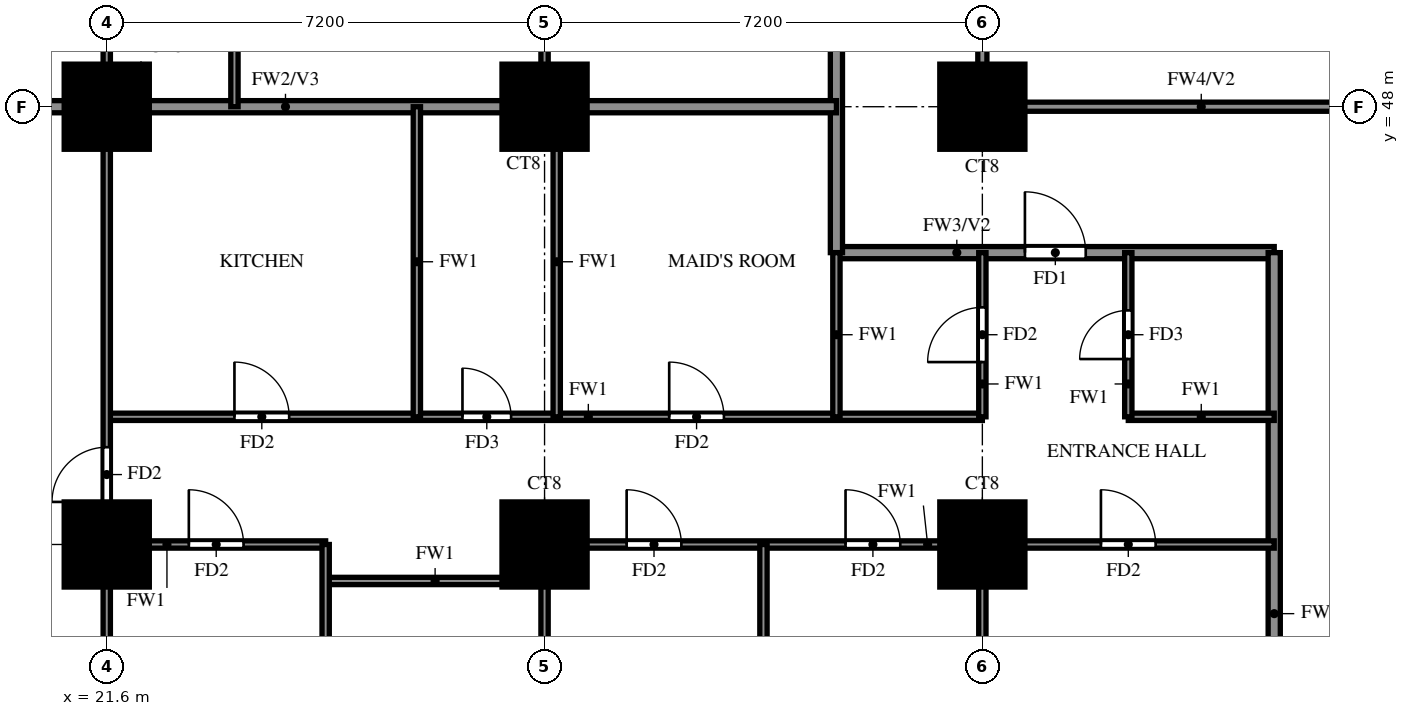
"""IFC4 building model, lengths in metres.
Left out: names, types, materials, properties, quantities, classifications, styles, units other than length and angle.
Written with IfcOpenShell. Run it as: python <this file> out.ifc"""

import sys

from ifc_helpers import new_model, si_unit, direction, frame, frame_2d, origin, origin_2d, place, context, subcontext, project, spatial, rectangle, extrude, source, transform, mapped, element, fill, save


model = new_model("IFC4")
c1 = context("Model", 3, precision=1e-05, world=origin(), true_north=direction((0.0, 1.0)))
c2 = subcontext(c1, "Body", "Model", "MODEL_VIEW")
j1 = project(units=[si_unit("LENGTHUNIT", "METRE"), si_unit("PLANEANGLEUNIT", "RADIAN")], contexts=[c1])
p1 = place(None, origin())
s1 = spatial("IfcSite", under=j1, at=p1, CompositionType="ELEMENT")
p2 = place(p1, origin())
s2 = spatial("IfcBuilding", under=s1, at=p2, CompositionType="ELEMENT")
p3 = place(p2, frame((0.0, 0.0, 41.0)))
s3 = spatial("IfcBuildingStorey", under=s2, at=p3, CompositionType="ELEMENT", Elevation=41.0)
m1 = source(origin(), c2, "Body", "SweptSolid", [
    extrude(rectangle(XDim=1.4, YDim=1.4, at=origin_2d()), origin(), (0.0, 0.0, 1.0), 3.18),
])
for number, where, z_axis, x_axis in (
    (1, (21.6, 40.8, 0.0), (0.0, 0.0, 1.0), (1.0, 0.0, 0.0)),
    (2, (28.8, 40.8, 0.0), (0.0, 0.0, 1.0), (1.0, 0.0, 0.0)),
    (3, (36.0, 40.8, 0.0), (0.0, 0.0, 1.0), (1.0, 0.0, 0.0)),
    (4, (21.6, 48.0, 0.0), (0.0, 0.0, 1.0), (1.0, 0.0, 0.0)),
    (5, (28.8, 48.0, 0.0), (0.0, 0.0, 1.0), (1.0, 0.0, 0.0)),
    (6, (36.0, 48.0, 0.0), (0.0, 0.0, 1.0), (1.0, 0.0, 0.0)),
):
    element("IfcColumn", number, at=place(p3, frame(where, z_axis=z_axis, x_axis=x_axis)), inside=s3, PredefinedType="COLUMN", context=c2, shape_type="MappedRepresentation", body=[
        mapped(m1, transform((0.0, 0.0, 0.0))),
    ])
p4 = place(p3, frame((33.6, 45.6, 0.0), z_axis=(0.0, 0.0, 1.0), x_axis=(1.0, 0.0, 0.0)))
e7 = element("IfcWall", 7, at=p4, inside=s3, PredefinedType="SOLIDWALL", context=c2, shape_type="SweptSolid", body=[
    extrude(rectangle(XDim=7.2, YDim=0.2, at=frame_2d((3.6, 0.0))), origin(), (0.0, 0.0, 1.0), 3.18),
])
p5 = place(p4, frame((3.1, 0.0, 0.0)))
e8 = element("IfcOpeningElement", 8, at=p5, cuts=e7, PredefinedType="OPENING", context=c2, shape_type="SweptSolid", body=[
    extrude(rectangle(XDim=1.0, YDim=2.1, at=frame_2d((0.5, 1.05))), frame((0.0, 0.11, 0.0), z_axis=(0.0, -1.0, 0.0), x_axis=(1.0, 0.0, 0.0)), (0.0, 0.0, 1.0), 0.22),
])
p6 = place(p3, frame((33.6, 45.6, 0.0), z_axis=(0.0, 0.0, 1.0), x_axis=(0.0, 1.0, 0.0)))
e9 = element("IfcWall", 9, at=p6, inside=s3, PredefinedType="SOLIDWALL", context=c2, shape_type="SweptSolid", body=[
    extrude(rectangle(XDim=8.4, YDim=0.2, at=frame_2d((4.2, 0.0))), origin(), (0.0, 0.0, 1.0), 3.18),
])
p7 = place(p3, frame((40.8, 33.725, 0.0), z_axis=(0.0, 0.0, 1.0), x_axis=(0.0, 1.0, 0.0)))
e10 = element("IfcWall", 10, at=p7, inside=s3, PredefinedType="SOLIDWALL", context=c2, shape_type="SweptSolid", body=[
    extrude(rectangle(XDim=11.875, YDim=0.2, at=frame_2d((5.938, 0.0))), origin(), (0.0, 0.0, 1.0), 2.28),
])
p8 = place(p3, frame((14.525, 48.0, 0.0), z_axis=(0.0, 0.0, 1.0), x_axis=(1.0, 0.0, 0.0)))
e11 = element("IfcWall", 11, at=p8, inside=s3, PredefinedType="SOLIDWALL", context=c2, shape_type="SweptSolid", body=[
    extrude(rectangle(XDim=19.075, YDim=0.2, at=frame_2d((9.538, 0.0))), origin(), (0.0, 0.0, 1.0), 3.18),
])
p9 = place(p3, frame((25.2, 40.2, 0.0), z_axis=(0.0, 0.0, 1.0), x_axis=(1.0, 0.0, 0.0)))
e12 = element("IfcWall", 12, at=p9, inside=s3, PredefinedType="PARTITIONING", context=c2, shape_type="SweptSolid", body=[
    extrude(rectangle(XDim=3.6, YDim=0.12, at=frame_2d((1.8, 0.0))), origin(), (0.0, 0.0, 1.0), 3.18),
])
p10 = place(p3, frame((21.6, 40.8, 0.0), z_axis=(0.0, 0.0, 1.0), x_axis=(1.0, 0.0, 0.0)))
e13 = element("IfcWall", 13, at=p10, inside=s3, PredefinedType="PARTITIONING", context=c2, shape_type="SweptSolid", body=[
    extrude(rectangle(XDim=3.6, YDim=0.12, at=frame_2d((1.8, 0.0))), origin(), (0.0, 0.0, 1.0), 3.18),
])
p11 = place(p10, frame((1.35, 0.0, 0.0)))
e14 = element("IfcOpeningElement", 14, at=p11, cuts=e13, PredefinedType="OPENING", context=c2, shape_type="SweptSolid", body=[
    extrude(rectangle(XDim=0.9, YDim=2.1, at=frame_2d((0.45, 1.05))), frame((0.0, 0.07, 0.0), z_axis=(0.0, -1.0, 0.0), x_axis=(1.0, 0.0, 0.0)), (0.0, 0.0, 1.0), 0.14),
])
p12 = place(p3, frame((28.8, 40.8, 0.0), z_axis=(0.0, 0.0, 1.0), x_axis=(1.0, 0.0, 0.0)))
e15 = element("IfcWall", 15, at=p12, inside=s3, PredefinedType="PARTITIONING", context=c2, shape_type="SweptSolid", body=[
    extrude(rectangle(XDim=12.0, YDim=0.12, at=frame_2d((6.0, 0.0))), origin(), (0.0, 0.0, 1.0), 3.18),
])
p13 = place(p12, frame((1.35, 0.0, 0.0)))
e16 = element("IfcOpeningElement", 16, at=p13, cuts=e15, PredefinedType="OPENING", context=c2, shape_type="SweptSolid", body=[
    extrude(rectangle(XDim=0.9, YDim=2.1, at=frame_2d((0.45, 1.05))), frame((0.0, 0.07, 0.0), z_axis=(0.0, -1.0, 0.0), x_axis=(1.0, 0.0, 0.0)), (0.0, 0.0, 1.0), 0.14),
])
p14 = place(p12, frame((4.95, 0.0, 0.0)))
e17 = element("IfcOpeningElement", 17, at=p14, cuts=e15, PredefinedType="OPENING", context=c2, shape_type="SweptSolid", body=[
    extrude(rectangle(XDim=0.9, YDim=2.1, at=frame_2d((0.45, 1.05))), frame((0.0, 0.07, 0.0), z_axis=(0.0, -1.0, 0.0), x_axis=(1.0, 0.0, 0.0)), (0.0, 0.0, 1.0), 0.14),
])
p15 = place(p12, frame((9.15, 0.0, 0.0)))
e18 = element("IfcOpeningElement", 18, at=p15, cuts=e15, PredefinedType="OPENING", context=c2, shape_type="SweptSolid", body=[
    extrude(rectangle(XDim=0.9, YDim=2.1, at=frame_2d((0.45, 1.05))), frame((0.0, 0.07, 0.0), z_axis=(0.0, -1.0, 0.0), x_axis=(1.0, 0.0, 0.0)), (0.0, 0.0, 1.0), 0.14),
])
p16 = place(p3, frame((21.6, 42.9, 0.0), z_axis=(0.0, 0.0, 1.0), x_axis=(1.0, 0.0, 0.0)))
e19 = element("IfcWall", 19, at=p16, inside=s3, PredefinedType="PARTITIONING", context=c2, shape_type="SweptSolid", body=[
    extrude(rectangle(XDim=14.4, YDim=0.12, at=frame_2d((7.2, 0.0))), origin(), (0.0, 0.0, 1.0), 3.18),
])
p17 = place(p16, frame((2.1, 0.0, 0.0)))
e20 = element("IfcOpeningElement", 20, at=p17, cuts=e19, PredefinedType="OPENING", context=c2, shape_type="SweptSolid", body=[
    extrude(rectangle(XDim=0.9, YDim=2.1, at=frame_2d((0.45, 1.05))), frame((0.0, 0.07, 0.0), z_axis=(0.0, -1.0, 0.0), x_axis=(1.0, 0.0, 0.0)), (0.0, 0.0, 1.0), 0.14),
])
p18 = place(p16, frame((5.85, 0.0, 0.0)))
e21 = element("IfcOpeningElement", 21, at=p18, cuts=e19, PredefinedType="OPENING", context=c2, shape_type="SweptSolid", body=[
    extrude(rectangle(XDim=0.8, YDim=2.1, at=frame_2d((0.4, 1.05))), frame((0.0, 0.07, 0.0), z_axis=(0.0, -1.0, 0.0), x_axis=(1.0, 0.0, 0.0)), (0.0, 0.0, 1.0), 0.14),
])
p19 = place(p16, frame((9.25, 0.0, 0.0)))
e22 = element("IfcOpeningElement", 22, at=p19, cuts=e19, PredefinedType="OPENING", context=c2, shape_type="SweptSolid", body=[
    extrude(rectangle(XDim=0.9, YDim=2.1, at=frame_2d((0.45, 1.05))), frame((0.0, 0.07, 0.0), z_axis=(0.0, -1.0, 0.0), x_axis=(1.0, 0.0, 0.0)), (0.0, 0.0, 1.0), 0.14),
])
p20 = place(p3, frame((38.4, 42.9, 0.0), z_axis=(0.0, 0.0, 1.0), x_axis=(1.0, 0.0, 0.0)))
e23 = element("IfcWall", 23, at=p20, inside=s3, PredefinedType="PARTITIONING", context=c2, shape_type="SweptSolid", body=[
    extrude(rectangle(XDim=2.4, YDim=0.12, at=frame_2d((1.2, 0.0))), origin(), (0.0, 0.0, 1.0), 3.18),
])
p21 = place(p3, frame((21.6, 33.725, 0.0), z_axis=(0.0, 0.0, 1.0), x_axis=(0.0, 1.0, 0.0)))
e24 = element("IfcWall", 24, at=p21, inside=s3, PredefinedType="PARTITIONING", context=c2, shape_type="SweptSolid", body=[
    extrude(rectangle(XDim=35.875, YDim=0.12, at=frame_2d((17.938, 0.0))), origin(), (0.0, 0.0, 1.0), 3.18),
])
p22 = place(p21, frame((7.775, 0.0, 0.0)))
e25 = element("IfcOpeningElement", 25, at=p22, cuts=e24, PredefinedType="OPENING", context=c2, shape_type="SweptSolid", body=[
    extrude(rectangle(XDim=0.9, YDim=2.1, at=frame_2d((0.45, 1.05))), frame((0.0, 0.07, 0.0), z_axis=(0.0, -1.0, 0.0), x_axis=(1.0, 0.0, 0.0)), (0.0, 0.0, 1.0), 0.14),
])
p23 = place(p21, frame((15.625, 0.0, 0.0)))
e26 = element("IfcOpeningElement", 26, at=p23, cuts=e24, PredefinedType="OPENING", context=c2, shape_type="SweptSolid", body=[
    extrude(rectangle(XDim=0.9, YDim=2.1, at=frame_2d((0.45, 1.05))), frame((0.0, 0.07, 0.0), z_axis=(0.0, -1.0, 0.0), x_axis=(1.0, 0.0, 0.0)), (0.0, 0.0, 1.0), 0.14),
])
p24 = place(p21, frame((22.225, 0.0, 0.0)))
e27 = element("IfcOpeningElement", 27, at=p24, cuts=e24, PredefinedType="OPENING", context=c2, shape_type="SweptSolid", body=[
    extrude(rectangle(XDim=1.5, YDim=2.1, at=frame_2d((0.75, 1.05))), frame((0.0, 0.07, 0.0), z_axis=(0.0, -1.0, 0.0), x_axis=(1.0, 0.0, 0.0)), (0.0, 0.0, 1.0), 0.14),
])
p25 = place(p21, frame((26.425, 0.0, 0.0)))
e28 = element("IfcOpeningElement", 28, at=p25, cuts=e24, PredefinedType="OPENING", context=c2, shape_type="SweptSolid", body=[
    extrude(rectangle(XDim=0.9, YDim=2.1, at=frame_2d((0.45, 1.05))), frame((0.0, 0.07, 0.0), z_axis=(0.0, -1.0, 0.0), x_axis=(1.0, 0.0, 0.0)), (0.0, 0.0, 1.0), 0.14),
])
p26 = place(p21, frame((31.825, 0.0, 0.0)))
e29 = element("IfcOpeningElement", 29, at=p26, cuts=e24, PredefinedType="OPENING", context=c2, shape_type="SweptSolid", body=[
    extrude(rectangle(XDim=0.9, YDim=2.1, at=frame_2d((0.45, 1.05))), frame((0.0, 0.07, 0.0), z_axis=(0.0, -1.0, 0.0), x_axis=(1.0, 0.0, 0.0)), (0.0, 0.0, 1.0), 0.14),
])
p27 = place(p3, frame((23.7, 48.0, 0.0), z_axis=(0.0, 0.0, 1.0), x_axis=(0.0, 1.0, 0.0)))
e30 = element("IfcWall", 30, at=p27, inside=s3, PredefinedType="PARTITIONING", context=c2, shape_type="SweptSolid", body=[
    extrude(rectangle(XDim=3.6, YDim=0.12, at=frame_2d((1.8, 0.0))), origin(), (0.0, 0.0, 1.0), 3.18),
])
p28 = place(p3, frame((25.2, 33.725, 0.0), z_axis=(0.0, 0.0, 1.0), x_axis=(0.0, 1.0, 0.0)))
e31 = element("IfcWall", 31, at=p28, inside=s3, PredefinedType="PARTITIONING", context=c2, shape_type="SweptSolid", body=[
    extrude(rectangle(XDim=7.075, YDim=0.12, at=frame_2d((3.538, 0.0))), origin(), (0.0, 0.0, 1.0), 2.28),
])
p29 = place(p28, frame((2.837, 0.0, 0.0)))
e32 = element("IfcOpeningElement", 32, at=p29, cuts=e31, PredefinedType="OPENING", context=c2, shape_type="SweptSolid", body=[
    extrude(rectangle(XDim=0.8, YDim=2.1, at=frame_2d((0.4, 1.05))), frame((0.0, 0.07, 0.0), z_axis=(0.0, -1.0, 0.0), x_axis=(1.0, 0.0, 0.0)), (0.0, 0.0, 1.0), 0.14),
])
p30 = place(p3, frame((26.7, 42.9, 0.0), z_axis=(0.0, 0.0, 1.0), x_axis=(0.0, 1.0, 0.0)))
e33 = element("IfcWall", 33, at=p30, inside=s3, PredefinedType="PARTITIONING", context=c2, shape_type="SweptSolid", body=[
    extrude(rectangle(XDim=5.1, YDim=0.12, at=frame_2d((2.55, 0.0))), origin(), (0.0, 0.0, 1.0), 3.18),
])
p31 = place(p3, frame((28.8, 33.725, 0.0), z_axis=(0.0, 0.0, 1.0), x_axis=(0.0, 1.0, 0.0)))
e34 = element("IfcWall", 34, at=p31, inside=s3, PredefinedType="PARTITIONING", context=c2, shape_type="SweptSolid", body=[
    extrude(rectangle(XDim=7.075, YDim=0.12, at=frame_2d((3.538, 0.0))), origin(), (0.0, 0.0, 1.0), 3.18),
])
p32 = place(p3, frame((28.8, 48.0, 0.0), z_axis=(0.0, 0.0, 1.0), x_axis=(0.0, 1.0, 0.0)))
e35 = element("IfcWall", 35, at=p32, inside=s3, PredefinedType="PARTITIONING", context=c2, shape_type="SweptSolid", body=[
    extrude(rectangle(XDim=3.6, YDim=0.12, at=frame_2d((1.8, 0.0))), origin(), (0.0, 0.0, 1.0), 3.18),
])
p33 = place(p3, frame((29.0, 42.9, 0.0), z_axis=(0.0, 0.0, 1.0), x_axis=(0.0, 1.0, 0.0)))
e36 = element("IfcWall", 36, at=p33, inside=s3, PredefinedType="PARTITIONING", context=c2, shape_type="SweptSolid", body=[
    extrude(rectangle(XDim=5.1, YDim=0.12, at=frame_2d((2.55, 0.0))), origin(), (0.0, 0.0, 1.0), 3.18),
])
p34 = place(p3, frame((32.4, 33.725, 0.0), z_axis=(0.0, 0.0, 1.0), x_axis=(0.0, 1.0, 0.0)))
e37 = element("IfcWall", 37, at=p34, inside=s3, PredefinedType="PARTITIONING", context=c2, shape_type="SweptSolid", body=[
    extrude(rectangle(XDim=7.075, YDim=0.12, at=frame_2d((3.538, 0.0))), origin(), (0.0, 0.0, 1.0), 2.28),
])
p35 = place(p3, frame((33.6, 42.9, 0.0), z_axis=(0.0, 0.0, 1.0), x_axis=(0.0, 1.0, 0.0)))
e38 = element("IfcWall", 38, at=p35, inside=s3, PredefinedType="PARTITIONING", context=c2, shape_type="SweptSolid", body=[
    extrude(rectangle(XDim=2.7, YDim=0.12, at=frame_2d((1.35, 0.0))), origin(), (0.0, 0.0, 1.0), 3.18),
])
p36 = place(p3, frame((36.0, 33.725, 0.0), z_axis=(0.0, 0.0, 1.0), x_axis=(0.0, 1.0, 0.0)))
e39 = element("IfcWall", 39, at=p36, inside=s3, PredefinedType="PARTITIONING", context=c2, shape_type="SweptSolid", body=[
    extrude(rectangle(XDim=7.075, YDim=0.12, at=frame_2d((3.538, 0.0))), origin(), (0.0, 0.0, 1.0), 3.18),
])
p37 = place(p3, frame((36.0, 42.9, 0.0), z_axis=(0.0, 0.0, 1.0), x_axis=(0.0, 1.0, 0.0)))
e40 = element("IfcWall", 40, at=p37, inside=s3, PredefinedType="PARTITIONING", context=c2, shape_type="SweptSolid", body=[
    extrude(rectangle(XDim=2.7, YDim=0.12, at=frame_2d((1.35, 0.0))), origin(), (0.0, 0.0, 1.0), 3.18),
])
p38 = place(p37, frame((0.9, 0.0, 0.0)))
e41 = element("IfcOpeningElement", 41, at=p38, cuts=e40, PredefinedType="OPENING", context=c2, shape_type="SweptSolid", body=[
    extrude(rectangle(XDim=0.9, YDim=2.1, at=frame_2d((0.45, 1.05))), frame((0.0, 0.07, 0.0), z_axis=(0.0, -1.0, 0.0), x_axis=(1.0, 0.0, 0.0)), (0.0, 0.0, 1.0), 0.14),
])
p39 = place(p3, frame((38.4, 42.9, 0.0), z_axis=(0.0, 0.0, 1.0), x_axis=(0.0, 1.0, 0.0)))
e42 = element("IfcWall", 42, at=p39, inside=s3, PredefinedType="PARTITIONING", context=c2, shape_type="SweptSolid", body=[
    extrude(rectangle(XDim=2.7, YDim=0.12, at=frame_2d((1.35, 0.0))), origin(), (0.0, 0.0, 1.0), 3.18),
])
p40 = place(p39, frame((0.95, 0.0, 0.0)))
e43 = element("IfcOpeningElement", 43, at=p40, cuts=e42, PredefinedType="OPENING", context=c2, shape_type="SweptSolid", body=[
    extrude(rectangle(XDim=0.8, YDim=2.1, at=frame_2d((0.4, 1.05))), frame((0.0, 0.07, 0.0), z_axis=(0.0, -1.0, 0.0), x_axis=(1.0, 0.0, 0.0)), (0.0, 0.0, 1.0), 0.14),
])
p41 = place(p3, frame((36.0, 48.0, 0.0), z_axis=(0.0, 0.0, 1.0), x_axis=(1.0, 0.0, 0.0)))
e44 = element("IfcWall", 44, at=p41, inside=s3, PredefinedType="SOLIDWALL", context=c2, shape_type="SweptSolid", body=[
    extrude(rectangle(XDim=7.2, YDim=0.15, at=frame_2d((3.6, 0.0))), origin(), (0.0, 0.0, 1.0), 2.28),
])
p42 = place(p3, frame((36.0, 48.0, 0.0), z_axis=(0.0, 0.0, 1.0), x_axis=(0.0, 1.0, 0.0)))
e45 = element("IfcWall", 45, at=p42, inside=s3, PredefinedType="SOLIDWALL", context=c2, shape_type="SweptSolid", body=[
    extrude(rectangle(XDim=14.4, YDim=0.15, at=frame_2d((7.2, 0.0))), origin(), (0.0, 0.0, 1.0), 2.28),
])
p43 = place(p5, origin())
e46 = element("IfcDoor", 46, at=p43, inside=s3, OperationType="SINGLE_SWING_RIGHT", PredefinedType="DOOR", context=c2, shape_type="SweptSolid", body=[
    extrude(rectangle(XDim=1.0, YDim=2.1, at=frame_2d((0.5, 1.05))), frame((0.0, 0.025, 0.0), z_axis=(0.0, -1.0, 0.0), x_axis=(1.0, 0.0, 0.0)), (0.0, 0.0, 1.0), 0.05),
])
fill(e8, e46)
p44 = place(p22, origin())
e47 = element("IfcDoor", 47, at=p44, inside=s3, OperationType="SINGLE_SWING_RIGHT", PredefinedType="DOOR", context=c2, shape_type="SweptSolid", body=[
    extrude(rectangle(XDim=0.9, YDim=2.1, at=frame_2d((0.45, 1.05))), frame((0.0, 0.025, 0.0), z_axis=(0.0, -1.0, 0.0), x_axis=(1.0, 0.0, 0.0)), (0.0, 0.0, 1.0), 0.05),
])
fill(e25, e47)
p45 = place(p11, origin())
e48 = element("IfcDoor", 48, at=p45, inside=s3, OperationType="SINGLE_SWING_LEFT", PredefinedType="DOOR", context=c2, shape_type="SweptSolid", body=[
    extrude(rectangle(XDim=0.9, YDim=2.1, at=frame_2d((0.45, 1.05))), frame((0.0, 0.025, 0.0), z_axis=(0.0, -1.0, 0.0), x_axis=(1.0, 0.0, 0.0)), (0.0, 0.0, 1.0), 0.05),
])
fill(e14, e48)
p46 = place(p13, origin())
e49 = element("IfcDoor", 49, at=p46, inside=s3, OperationType="SINGLE_SWING_LEFT", PredefinedType="DOOR", context=c2, shape_type="SweptSolid", body=[
    extrude(rectangle(XDim=0.9, YDim=2.1, at=frame_2d((0.45, 1.05))), frame((0.0, 0.025, 0.0), z_axis=(0.0, -1.0, 0.0), x_axis=(1.0, 0.0, 0.0)), (0.0, 0.0, 1.0), 0.05),
])
fill(e16, e49)
p47 = place(p14, origin())
e50 = element("IfcDoor", 50, at=p47, inside=s3, OperationType="SINGLE_SWING_LEFT", PredefinedType="DOOR", context=c2, shape_type="SweptSolid", body=[
    extrude(rectangle(XDim=0.9, YDim=2.1, at=frame_2d((0.45, 1.05))), frame((0.0, 0.025, 0.0), z_axis=(0.0, -1.0, 0.0), x_axis=(1.0, 0.0, 0.0)), (0.0, 0.0, 1.0), 0.05),
])
fill(e17, e50)
p48 = place(p15, origin())
e51 = element("IfcDoor", 51, at=p48, inside=s3, OperationType="SINGLE_SWING_RIGHT", PredefinedType="DOOR", context=c2, shape_type="SweptSolid", body=[
    extrude(rectangle(XDim=0.9, YDim=2.1, at=frame_2d((0.45, 1.05))), frame((0.0, 0.025, 0.0), z_axis=(0.0, -1.0, 0.0), x_axis=(1.0, 0.0, 0.0)), (0.0, 0.0, 1.0), 0.05),
])
fill(e18, e51)
p49 = place(p17, origin())
e52 = element("IfcDoor", 52, at=p49, inside=s3, OperationType="SINGLE_SWING_LEFT", PredefinedType="DOOR", context=c2, shape_type="SweptSolid", body=[
    extrude(rectangle(XDim=0.9, YDim=2.1, at=frame_2d((0.45, 1.05))), frame((0.0, 0.025, 0.0), z_axis=(0.0, -1.0, 0.0), x_axis=(1.0, 0.0, 0.0)), (0.0, 0.0, 1.0), 0.05),
])
fill(e20, e52)
p50 = place(p18, origin())
e53 = element("IfcDoor", 53, at=p50, inside=s3, OperationType="SINGLE_SWING_LEFT", PredefinedType="DOOR", context=c2, shape_type="SweptSolid", body=[
    extrude(rectangle(XDim=0.8, YDim=2.1, at=frame_2d((0.4, 1.05))), frame((0.0, 0.025, 0.0), z_axis=(0.0, -1.0, 0.0), x_axis=(1.0, 0.0, 0.0)), (0.0, 0.0, 1.0), 0.05),
])
fill(e21, e53)
p51 = place(p19, origin())
e54 = element("IfcDoor", 54, at=p51, inside=s3, OperationType="SINGLE_SWING_RIGHT", PredefinedType="DOOR", context=c2, shape_type="SweptSolid", body=[
    extrude(rectangle(XDim=0.9, YDim=2.1, at=frame_2d((0.45, 1.05))), frame((0.0, 0.025, 0.0), z_axis=(0.0, -1.0, 0.0), x_axis=(1.0, 0.0, 0.0)), (0.0, 0.0, 1.0), 0.05),
])
fill(e22, e54)
p52 = place(p38, origin())
e55 = element("IfcDoor", 55, at=p52, inside=s3, OperationType="SINGLE_SWING_LEFT", PredefinedType="DOOR", context=c2, shape_type="SweptSolid", body=[
    extrude(rectangle(XDim=0.9, YDim=2.1, at=frame_2d((0.45, 1.05))), frame((0.0, 0.025, 0.0), z_axis=(0.0, -1.0, 0.0), x_axis=(1.0, 0.0, 0.0)), (0.0, 0.0, 1.0), 0.05),
])
fill(e41, e55)
p53 = place(p40, origin())
e56 = element("IfcDoor", 56, at=p53, inside=s3, OperationType="SINGLE_SWING_LEFT", PredefinedType="DOOR", context=c2, shape_type="SweptSolid", body=[
    extrude(rectangle(XDim=0.8, YDim=2.1, at=frame_2d((0.4, 1.05))), frame((0.0, 0.025, 0.0), z_axis=(0.0, -1.0, 0.0), x_axis=(1.0, 0.0, 0.0)), (0.0, 0.0, 1.0), 0.05),
])
fill(e43, e56)
save(model, sys.argv[1])
